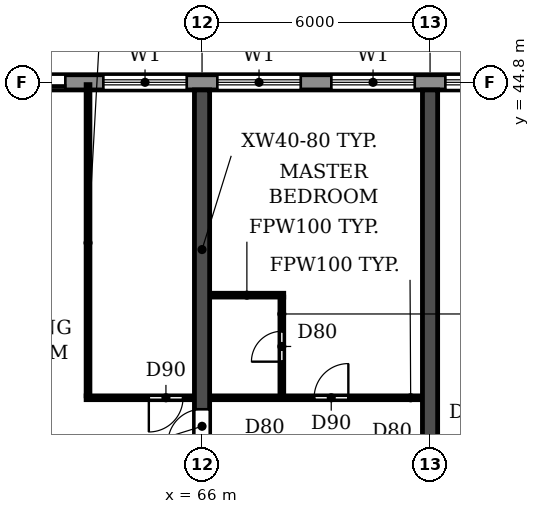
"""IFC4 building model, lengths in metres.
Left out: names, types, materials, properties, quantities, classifications, styles, units other than length and angle.
Written with IfcOpenShell. Run it as: python <this file> out.ifc"""

import sys

from ifc_helpers import new_model, si_unit, direction, frame, frame_2d, origin, place, context, subcontext, project, spatial, rectangle, extrude, element, fill, save


model = new_model("IFC4")
c1 = context("Model", 3, precision=1e-05, world=origin(), true_north=direction((0.0, 1.0)))
c2 = subcontext(c1, "Body", "Model", "MODEL_VIEW")
j1 = project(units=[si_unit("LENGTHUNIT", "METRE"), si_unit("PLANEANGLEUNIT", "RADIAN")], contexts=[c1])
p1 = place(None, origin())
s1 = spatial("IfcSite", under=j1, at=p1, CompositionType="ELEMENT")
p2 = place(p1, origin())
s2 = spatial("IfcBuilding", under=s1, at=p2, CompositionType="ELEMENT")
p3 = place(p2, frame((0.0, 0.0, 23.4)))
s3 = spatial("IfcBuildingStorey", under=s2, at=p3, CompositionType="ELEMENT", Elevation=23.4)
p4 = place(p3, frame((66.0, 30.55, 0.0), z_axis=(0.0, 0.0, 1.0), x_axis=(0.0, 1.0, 0.0)))
e1 = element("IfcWall", 1, at=p4, inside=s3, PredefinedType="SHEAR", context=c2, shape_type="SweptSolid", body=[
    extrude(rectangle(XDim=14.05, YDim=0.4, at=frame_2d((7.025, 0.0))), origin(), (0.0, 0.0, 1.0), 3.05),
])
p5 = place(p4, frame((4.75, 0.0, 0.0)))
e2 = element("IfcOpeningElement", 2, at=p5, cuts=e1, PredefinedType="OPENING", context=c2, shape_type="SweptSolid", body=[
    extrude(rectangle(XDim=0.9, YDim=2.1, at=frame_2d((0.45, 1.05))), frame((0.0, 0.21, 0.0), z_axis=(0.0, -1.0, 0.0), x_axis=(1.0, 0.0, 0.0)), (0.0, 0.0, 1.0), 0.42),
])
p6 = place(p3, frame((72.0, 30.55, 0.0), z_axis=(0.0, 0.0, 1.0), x_axis=(0.0, 1.0, 0.0)))
e3 = element("IfcWall", 3, at=p6, inside=s3, PredefinedType="SHEAR", context=c2, shape_type="SweptSolid", body=[
    extrude(rectangle(XDim=14.05, YDim=0.4, at=frame_2d((7.025, 0.0))), origin(), (0.0, 0.0, 1.0), 3.05),
])
p7 = place(p3, frame((97.317, 44.8, 0.0), z_axis=(0.0, 0.0, 1.0), x_axis=(-1.0, 0.0, 0.0)))
e4 = element("IfcWall", 4, at=p7, inside=s3, PredefinedType="STANDARD", context=c2, shape_type="SweptSolid", body=[
    extrude(rectangle(XDim=92.634, YDim=0.4, at=frame_2d((46.317, 0.0))), origin(), (0.0, 0.0, 1.0), 3.05),
])
p8 = place(p7, frame((88.717, 0.0, 0.9)))
e5 = element("IfcOpeningElement", 5, at=p8, cuts=e4, PredefinedType="OPENING", context=c2, shape_type="SweptSolid", body=[
    extrude(rectangle(XDim=2.2, YDim=1.5, at=frame_2d((1.1, 0.75))), frame((0.0, 0.21, 0.0), z_axis=(0.0, -1.0, 0.0), x_axis=(1.0, 0.0, 0.0)), (0.0, 0.0, 1.0), 0.42),
])
p9 = place(p7, frame((85.917, 0.0, 0.0)))
e6 = element("IfcOpeningElement", 6, at=p9, cuts=e4, PredefinedType="OPENING", context=c2, shape_type="SweptSolid", body=[
    extrude(rectangle(XDim=1.8, YDim=2.4, at=frame_2d((0.9, 1.2))), frame((0.0, 0.21, 0.0), z_axis=(0.0, -1.0, 0.0), x_axis=(1.0, 0.0, 0.0)), (0.0, 0.0, 1.0), 0.42),
])
p10 = place(p7, frame((82.717, 0.0, 0.9)))
e7 = element("IfcOpeningElement", 7, at=p10, cuts=e4, PredefinedType="OPENING", context=c2, shape_type="SweptSolid", body=[
    extrude(rectangle(XDim=2.2, YDim=1.5, at=frame_2d((1.1, 0.75))), frame((0.0, 0.21, 0.0), z_axis=(0.0, -1.0, 0.0), x_axis=(1.0, 0.0, 0.0)), (0.0, 0.0, 1.0), 0.42),
])
p11 = place(p7, frame((79.717, 0.0, 0.9)))
e8 = element("IfcOpeningElement", 8, at=p11, cuts=e4, PredefinedType="OPENING", context=c2, shape_type="SweptSolid", body=[
    extrude(rectangle(XDim=2.2, YDim=1.5, at=frame_2d((1.1, 0.75))), frame((0.0, 0.21, 0.0), z_axis=(0.0, -1.0, 0.0), x_axis=(1.0, 0.0, 0.0)), (0.0, 0.0, 1.0), 0.42),
])
p12 = place(p7, frame((76.917, 0.0, 0.0)))
e9 = element("IfcOpeningElement", 9, at=p12, cuts=e4, PredefinedType="OPENING", context=c2, shape_type="SweptSolid", body=[
    extrude(rectangle(XDim=1.8, YDim=2.4, at=frame_2d((0.9, 1.2))), frame((0.0, 0.21, 0.0), z_axis=(0.0, -1.0, 0.0), x_axis=(1.0, 0.0, 0.0)), (0.0, 0.0, 1.0), 0.42),
])
p13 = place(p7, frame((73.717, 0.0, 0.9)))
e10 = element("IfcOpeningElement", 10, at=p13, cuts=e4, PredefinedType="OPENING", context=c2, shape_type="SweptSolid", body=[
    extrude(rectangle(XDim=2.2, YDim=1.5, at=frame_2d((1.1, 0.75))), frame((0.0, 0.21, 0.0), z_axis=(0.0, -1.0, 0.0), x_axis=(1.0, 0.0, 0.0)), (0.0, 0.0, 1.0), 0.42),
])
p14 = place(p7, frame((70.717, 0.0, 0.9)))
e11 = element("IfcOpeningElement", 11, at=p14, cuts=e4, PredefinedType="OPENING", context=c2, shape_type="SweptSolid", body=[
    extrude(rectangle(XDim=2.2, YDim=1.5, at=frame_2d((1.1, 0.75))), frame((0.0, 0.21, 0.0), z_axis=(0.0, -1.0, 0.0), x_axis=(1.0, 0.0, 0.0)), (0.0, 0.0, 1.0), 0.42),
])
p15 = place(p7, frame((67.717, 0.0, 0.9)))
e12 = element("IfcOpeningElement", 12, at=p15, cuts=e4, PredefinedType="OPENING", context=c2, shape_type="SweptSolid", body=[
    extrude(rectangle(XDim=2.2, YDim=1.5, at=frame_2d((1.1, 0.75))), frame((0.0, 0.21, 0.0), z_axis=(0.0, -1.0, 0.0), x_axis=(1.0, 0.0, 0.0)), (0.0, 0.0, 1.0), 0.42),
])
p16 = place(p7, frame((64.917, 0.0, 0.0)))
e13 = element("IfcOpeningElement", 13, at=p16, cuts=e4, PredefinedType="OPENING", context=c2, shape_type="SweptSolid", body=[
    extrude(rectangle(XDim=1.8, YDim=2.4, at=frame_2d((0.9, 1.2))), frame((0.0, 0.21, 0.0), z_axis=(0.0, -1.0, 0.0), x_axis=(1.0, 0.0, 0.0)), (0.0, 0.0, 1.0), 0.42),
])
p17 = place(p7, frame((61.717, 0.0, 0.9)))
e14 = element("IfcOpeningElement", 14, at=p17, cuts=e4, PredefinedType="OPENING", context=c2, shape_type="SweptSolid", body=[
    extrude(rectangle(XDim=2.2, YDim=1.5, at=frame_2d((1.1, 0.75))), frame((0.0, 0.21, 0.0), z_axis=(0.0, -1.0, 0.0), x_axis=(1.0, 0.0, 0.0)), (0.0, 0.0, 1.0), 0.42),
])
p18 = place(p7, frame((58.717, 0.0, 0.9)))
e15 = element("IfcOpeningElement", 15, at=p18, cuts=e4, PredefinedType="OPENING", context=c2, shape_type="SweptSolid", body=[
    extrude(rectangle(XDim=2.2, YDim=1.5, at=frame_2d((1.1, 0.75))), frame((0.0, 0.21, 0.0), z_axis=(0.0, -1.0, 0.0), x_axis=(1.0, 0.0, 0.0)), (0.0, 0.0, 1.0), 0.42),
])
p19 = place(p7, frame((55.917, 0.0, 0.0)))
e16 = element("IfcOpeningElement", 16, at=p19, cuts=e4, PredefinedType="OPENING", context=c2, shape_type="SweptSolid", body=[
    extrude(rectangle(XDim=1.8, YDim=2.4, at=frame_2d((0.9, 1.2))), frame((0.0, 0.21, 0.0), z_axis=(0.0, -1.0, 0.0), x_axis=(1.0, 0.0, 0.0)), (0.0, 0.0, 1.0), 0.42),
])
p20 = place(p7, frame((52.917, 0.0, 0.0)))
e17 = element("IfcOpeningElement", 17, at=p20, cuts=e4, PredefinedType="OPENING", context=c2, shape_type="SweptSolid", body=[
    extrude(rectangle(XDim=1.8, YDim=2.4, at=frame_2d((0.9, 1.2))), frame((0.0, 0.21, 0.0), z_axis=(0.0, -1.0, 0.0), x_axis=(1.0, 0.0, 0.0)), (0.0, 0.0, 1.0), 0.42),
])
p21 = place(p7, frame((49.717, 0.0, 0.9)))
e18 = element("IfcOpeningElement", 18, at=p21, cuts=e4, PredefinedType="OPENING", context=c2, shape_type="SweptSolid", body=[
    extrude(rectangle(XDim=2.2, YDim=1.5, at=frame_2d((1.1, 0.75))), frame((0.0, 0.21, 0.0), z_axis=(0.0, -1.0, 0.0), x_axis=(1.0, 0.0, 0.0)), (0.0, 0.0, 1.0), 0.42),
])
p22 = place(p7, frame((46.917, 0.0, 0.0)))
e19 = element("IfcOpeningElement", 19, at=p22, cuts=e4, PredefinedType="OPENING", context=c2, shape_type="SweptSolid", body=[
    extrude(rectangle(XDim=1.8, YDim=2.4, at=frame_2d((0.9, 1.2))), frame((0.0, 0.21, 0.0), z_axis=(0.0, -1.0, 0.0), x_axis=(1.0, 0.0, 0.0)), (0.0, 0.0, 1.0), 0.42),
])
p23 = place(p7, frame((43.717, 0.0, 0.9)))
e20 = element("IfcOpeningElement", 20, at=p23, cuts=e4, PredefinedType="OPENING", context=c2, shape_type="SweptSolid", body=[
    extrude(rectangle(XDim=2.2, YDim=1.5, at=frame_2d((1.1, 0.75))), frame((0.0, 0.21, 0.0), z_axis=(0.0, -1.0, 0.0), x_axis=(1.0, 0.0, 0.0)), (0.0, 0.0, 1.0), 0.42),
])
p24 = place(p7, frame((40.717, 0.0, 0.9)))
e21 = element("IfcOpeningElement", 21, at=p24, cuts=e4, PredefinedType="OPENING", context=c2, shape_type="SweptSolid", body=[
    extrude(rectangle(XDim=2.2, YDim=1.5, at=frame_2d((1.1, 0.75))), frame((0.0, 0.21, 0.0), z_axis=(0.0, -1.0, 0.0), x_axis=(1.0, 0.0, 0.0)), (0.0, 0.0, 1.0), 0.42),
])
p25 = place(p7, frame((37.917, 0.0, 0.0)))
e22 = element("IfcOpeningElement", 22, at=p25, cuts=e4, PredefinedType="OPENING", context=c2, shape_type="SweptSolid", body=[
    extrude(rectangle(XDim=1.8, YDim=2.4, at=frame_2d((0.9, 1.2))), frame((0.0, 0.21, 0.0), z_axis=(0.0, -1.0, 0.0), x_axis=(1.0, 0.0, 0.0)), (0.0, 0.0, 1.0), 0.42),
])
p26 = place(p7, frame((34.917, 0.0, 0.0)))
e23 = element("IfcOpeningElement", 23, at=p26, cuts=e4, PredefinedType="OPENING", context=c2, shape_type="SweptSolid", body=[
    extrude(rectangle(XDim=1.8, YDim=2.4, at=frame_2d((0.9, 1.2))), frame((0.0, 0.21, 0.0), z_axis=(0.0, -1.0, 0.0), x_axis=(1.0, 0.0, 0.0)), (0.0, 0.0, 1.0), 0.42),
])
p27 = place(p7, frame((31.717, 0.0, 0.9)))
e24 = element("IfcOpeningElement", 24, at=p27, cuts=e4, PredefinedType="OPENING", context=c2, shape_type="SweptSolid", body=[
    extrude(rectangle(XDim=2.2, YDim=1.5, at=frame_2d((1.1, 0.75))), frame((0.0, 0.21, 0.0), z_axis=(0.0, -1.0, 0.0), x_axis=(1.0, 0.0, 0.0)), (0.0, 0.0, 1.0), 0.42),
])
p28 = place(p7, frame((28.717, 0.0, 0.9)))
e25 = element("IfcOpeningElement", 25, at=p28, cuts=e4, PredefinedType="OPENING", context=c2, shape_type="SweptSolid", body=[
    extrude(rectangle(XDim=2.2, YDim=1.5, at=frame_2d((1.1, 0.75))), frame((0.0, 0.21, 0.0), z_axis=(0.0, -1.0, 0.0), x_axis=(1.0, 0.0, 0.0)), (0.0, 0.0, 1.0), 0.42),
])
p29 = place(p7, frame((25.717, 0.0, 0.9)))
e26 = element("IfcOpeningElement", 26, at=p29, cuts=e4, PredefinedType="OPENING", context=c2, shape_type="SweptSolid", body=[
    extrude(rectangle(XDim=2.2, YDim=1.5, at=frame_2d((1.1, 0.75))), frame((0.0, 0.21, 0.0), z_axis=(0.0, -1.0, 0.0), x_axis=(1.0, 0.0, 0.0)), (0.0, 0.0, 1.0), 0.42),
])
p30 = place(p7, frame((22.717, 0.0, 0.9)))
e27 = element("IfcOpeningElement", 27, at=p30, cuts=e4, PredefinedType="OPENING", context=c2, shape_type="SweptSolid", body=[
    extrude(rectangle(XDim=2.2, YDim=1.5, at=frame_2d((1.1, 0.75))), frame((0.0, 0.21, 0.0), z_axis=(0.0, -1.0, 0.0), x_axis=(1.0, 0.0, 0.0)), (0.0, 0.0, 1.0), 0.42),
])
p31 = place(p7, frame((19.917, 0.0, 0.0)))
e28 = element("IfcOpeningElement", 28, at=p31, cuts=e4, PredefinedType="OPENING", context=c2, shape_type="SweptSolid", body=[
    extrude(rectangle(XDim=1.8, YDim=2.4, at=frame_2d((0.9, 1.2))), frame((0.0, 0.21, 0.0), z_axis=(0.0, -1.0, 0.0), x_axis=(1.0, 0.0, 0.0)), (0.0, 0.0, 1.0), 0.42),
])
p32 = place(p7, frame((16.717, 0.0, 0.9)))
e29 = element("IfcOpeningElement", 29, at=p32, cuts=e4, PredefinedType="OPENING", context=c2, shape_type="SweptSolid", body=[
    extrude(rectangle(XDim=2.2, YDim=1.5, at=frame_2d((1.1, 0.75))), frame((0.0, 0.21, 0.0), z_axis=(0.0, -1.0, 0.0), x_axis=(1.0, 0.0, 0.0)), (0.0, 0.0, 1.0), 0.42),
])
p33 = place(p7, frame((13.717, 0.0, 0.9)))
e30 = element("IfcOpeningElement", 30, at=p33, cuts=e4, PredefinedType="OPENING", context=c2, shape_type="SweptSolid", body=[
    extrude(rectangle(XDim=2.2, YDim=1.5, at=frame_2d((1.1, 0.75))), frame((0.0, 0.21, 0.0), z_axis=(0.0, -1.0, 0.0), x_axis=(1.0, 0.0, 0.0)), (0.0, 0.0, 1.0), 0.42),
])
p34 = place(p7, frame((10.717, 0.0, 0.9)))
e31 = element("IfcOpeningElement", 31, at=p34, cuts=e4, PredefinedType="OPENING", context=c2, shape_type="SweptSolid", body=[
    extrude(rectangle(XDim=2.2, YDim=1.5, at=frame_2d((1.1, 0.75))), frame((0.0, 0.21, 0.0), z_axis=(0.0, -1.0, 0.0), x_axis=(1.0, 0.0, 0.0)), (0.0, 0.0, 1.0), 0.42),
])
p35 = place(p7, frame((7.917, 0.0, 0.0)))
e32 = element("IfcOpeningElement", 32, at=p35, cuts=e4, PredefinedType="OPENING", context=c2, shape_type="SweptSolid", body=[
    extrude(rectangle(XDim=1.8, YDim=2.4, at=frame_2d((0.9, 1.2))), frame((0.0, 0.21, 0.0), z_axis=(0.0, -1.0, 0.0), x_axis=(1.0, 0.0, 0.0)), (0.0, 0.0, 1.0), 0.42),
])
p36 = place(p7, frame((4.917, 0.0, 0.0)))
e33 = element("IfcOpeningElement", 33, at=p36, cuts=e4, PredefinedType="OPENING", context=c2, shape_type="SweptSolid", body=[
    extrude(rectangle(XDim=1.8, YDim=2.4, at=frame_2d((0.9, 1.2))), frame((0.0, 0.21, 0.0), z_axis=(0.0, -1.0, 0.0), x_axis=(1.0, 0.0, 0.0)), (0.0, 0.0, 1.0), 0.42),
])
p37 = place(p7, frame((1.717, 0.0, 0.9)))
e34 = element("IfcOpeningElement", 34, at=p37, cuts=e4, PredefinedType="OPENING", context=c2, shape_type="SweptSolid", body=[
    extrude(rectangle(XDim=2.2, YDim=1.5, at=frame_2d((1.1, 0.75))), frame((0.0, 0.21, 0.0), z_axis=(0.0, -1.0, 0.0), x_axis=(1.0, 0.0, 0.0)), (0.0, 0.0, 1.0), 0.42),
])
p38 = place(p3, frame((62.95, 36.5, 0.0), z_axis=(0.0, 0.0, 1.0), x_axis=(1.0, 0.0, 0.0)))
e35 = element("IfcWall", 35, at=p38, inside=s3, PredefinedType="PARTITIONING", context=c2, shape_type="SweptSolid", body=[
    extrude(rectangle(XDim=2.84, YDim=0.1, at=frame_2d((1.42, 0.0))), origin(), (0.0, 0.0, 1.0), 3.05),
])
p39 = place(p38, frame((1.65, 0.0, 0.0)))
e36 = element("IfcOpeningElement", 36, at=p39, cuts=e35, PredefinedType="OPENING", context=c2, shape_type="SweptSolid", body=[
    extrude(rectangle(XDim=0.9, YDim=2.1, at=frame_2d((0.45, 1.05))), frame((0.0, 0.06, 0.0), z_axis=(0.0, -1.0, 0.0), x_axis=(1.0, 0.0, 0.0)), (0.0, 0.0, 1.0), 0.12),
])
p40 = place(p3, frame((66.21, 36.5, 0.0), z_axis=(0.0, 0.0, 1.0), x_axis=(1.0, 0.0, 0.0)))
e37 = element("IfcWall", 37, at=p40, inside=s3, PredefinedType="PARTITIONING", context=c2, shape_type="SweptSolid", body=[
    extrude(rectangle(XDim=5.58, YDim=0.1, at=frame_2d((2.79, 0.0))), origin(), (0.0, 0.0, 1.0), 3.05),
])
p41 = place(p40, frame((2.74, 0.0, 0.0)))
e38 = element("IfcOpeningElement", 38, at=p41, cuts=e37, PredefinedType="OPENING", context=c2, shape_type="SweptSolid", body=[
    extrude(rectangle(XDim=0.9, YDim=2.1, at=frame_2d((0.45, 1.05))), frame((0.0, 0.06, 0.0), z_axis=(0.0, -1.0, 0.0), x_axis=(1.0, 0.0, 0.0)), (0.0, 0.0, 1.0), 0.12),
])
p42 = place(p3, frame((66.21, 39.2, 0.0), z_axis=(0.0, 0.0, 1.0), x_axis=(1.0, 0.0, 0.0)))
e39 = element("IfcWall", 39, at=p42, inside=s3, PredefinedType="PARTITIONING", context=c2, shape_type="SweptSolid", body=[
    extrude(rectangle(XDim=1.94, YDim=0.1, at=frame_2d((0.97, 0.0))), origin(), (0.0, 0.0, 1.0), 3.05),
])
p43 = place(p3, frame((63.0, 36.55, 0.0), z_axis=(0.0, 0.0, 1.0), x_axis=(0.0, 1.0, 0.0)))
e40 = element("IfcWall", 40, at=p43, inside=s3, PredefinedType="PARTITIONING", context=c2, shape_type="SweptSolid", body=[
    extrude(rectangle(XDim=8.19, YDim=0.1, at=frame_2d((4.095, 0.0))), origin(), (0.0, 0.0, 1.0), 3.05),
])
p44 = place(p3, frame((68.1, 36.55, 0.0), z_axis=(0.0, 0.0, 1.0), x_axis=(0.0, 1.0, 0.0)))
e41 = element("IfcWall", 41, at=p44, inside=s3, PredefinedType="PARTITIONING", context=c2, shape_type="SweptSolid", body=[
    extrude(rectangle(XDim=2.6, YDim=0.1, at=frame_2d((1.3, 0.0))), origin(), (0.0, 0.0, 1.0), 3.05),
])
p45 = place(p44, frame((0.9, 0.0, 0.0)))
e42 = element("IfcOpeningElement", 42, at=p45, cuts=e41, PredefinedType="OPENING", context=c2, shape_type="SweptSolid", body=[
    extrude(rectangle(XDim=0.8, YDim=2.1, at=frame_2d((0.4, 1.05))), frame((0.0, 0.06, 0.0), z_axis=(0.0, -1.0, 0.0), x_axis=(1.0, 0.0, 0.0)), (0.0, 0.0, 1.0), 0.12),
])
p46 = place(p26, origin())
e43 = element("IfcDoor", 43, at=p46, inside=s3, OperationType="DOUBLE_DOOR_SLIDING", PredefinedType="DOOR", context=c2, shape_type="SweptSolid", body=[
    extrude(rectangle(XDim=1.8, YDim=2.4, at=frame_2d((0.9, 1.2))), frame((0.0, 0.025, 0.0), z_axis=(0.0, -1.0, 0.0), x_axis=(1.0, 0.0, 0.0)), (0.0, 0.0, 1.0), 0.05),
])
fill(e23, e43)
p47 = place(p27, origin())
e44 = element("IfcWindow", 44, at=p47, inside=s3, PartitioningType="DOUBLE_PANEL_HORIZONTAL", PredefinedType="WINDOW", context=c2, shape_type="SweptSolid", body=[
    extrude(rectangle(XDim=2.2, YDim=1.5, at=frame_2d((1.1, 0.75))), frame((0.0, 0.03, 0.0), z_axis=(0.0, -1.0, 0.0), x_axis=(1.0, 0.0, 0.0)), (0.0, 0.0, 1.0), 0.06),
])
fill(e24, e44)
p48 = place(p28, origin())
e45 = element("IfcWindow", 45, at=p48, inside=s3, PartitioningType="DOUBLE_PANEL_HORIZONTAL", PredefinedType="WINDOW", context=c2, shape_type="SweptSolid", body=[
    extrude(rectangle(XDim=2.2, YDim=1.5, at=frame_2d((1.1, 0.75))), frame((0.0, 0.03, 0.0), z_axis=(0.0, -1.0, 0.0), x_axis=(1.0, 0.0, 0.0)), (0.0, 0.0, 1.0), 0.06),
])
fill(e25, e45)
p49 = place(p29, origin())
e46 = element("IfcWindow", 46, at=p49, inside=s3, PartitioningType="DOUBLE_PANEL_HORIZONTAL", PredefinedType="WINDOW", context=c2, shape_type="SweptSolid", body=[
    extrude(rectangle(XDim=2.2, YDim=1.5, at=frame_2d((1.1, 0.75))), frame((0.0, 0.03, 0.0), z_axis=(0.0, -1.0, 0.0), x_axis=(1.0, 0.0, 0.0)), (0.0, 0.0, 1.0), 0.06),
])
fill(e26, e46)
p50 = place(p30, origin())
e47 = element("IfcWindow", 47, at=p50, inside=s3, PartitioningType="DOUBLE_PANEL_HORIZONTAL", PredefinedType="WINDOW", context=c2, shape_type="SweptSolid", body=[
    extrude(rectangle(XDim=2.2, YDim=1.5, at=frame_2d((1.1, 0.75))), frame((0.0, 0.03, 0.0), z_axis=(0.0, -1.0, 0.0), x_axis=(1.0, 0.0, 0.0)), (0.0, 0.0, 1.0), 0.06),
])
fill(e27, e47)
p51 = place(p41, origin())
e48 = element("IfcDoor", 48, at=p51, inside=s3, OperationType="SINGLE_SWING_RIGHT", PredefinedType="DOOR", context=c2, shape_type="SweptSolid", body=[
    extrude(rectangle(XDim=0.9, YDim=2.1, at=frame_2d((0.45, 1.05))), frame((0.0, 0.025, 0.0), z_axis=(0.0, -1.0, 0.0), x_axis=(1.0, 0.0, 0.0)), (0.0, 0.0, 1.0), 0.05),
])
fill(e38, e48)
p52 = place(p39, frame((0.9, 0.0, 0.0), z_axis=(0.0, 0.0, 1.0), x_axis=(-1.0, 0.0, 0.0)))
e49 = element("IfcDoor", 49, at=p52, inside=s3, OperationType="SINGLE_SWING_RIGHT", PredefinedType="DOOR", context=c2, shape_type="SweptSolid", body=[
    extrude(rectangle(XDim=0.9, YDim=2.1, at=frame_2d((0.45, 1.05))), frame((0.0, 0.025, 0.0), z_axis=(0.0, -1.0, 0.0), x_axis=(1.0, 0.0, 0.0)), (0.0, 0.0, 1.0), 0.05),
])
fill(e36, e49)
p53 = place(p5, origin())
e50 = element("IfcDoor", 50, at=p53, inside=s3, OperationType="SINGLE_SWING_LEFT", PredefinedType="DOOR", context=c2, shape_type="SweptSolid", body=[
    extrude(rectangle(XDim=0.9, YDim=2.1, at=frame_2d((0.45, 1.05))), frame((0.0, 0.025, 0.0), z_axis=(0.0, -1.0, 0.0), x_axis=(1.0, 0.0, 0.0)), (0.0, 0.0, 1.0), 0.05),
])
fill(e2, e50)
p54 = place(p45, origin())
e51 = element("IfcDoor", 51, at=p54, inside=s3, OperationType="SINGLE_SWING_LEFT", PredefinedType="DOOR", context=c2, shape_type="SweptSolid", body=[
    extrude(rectangle(XDim=0.8, YDim=2.1, at=frame_2d((0.4, 1.05))), frame((0.0, 0.025, 0.0), z_axis=(0.0, -1.0, 0.0), x_axis=(1.0, 0.0, 0.0)), (0.0, 0.0, 1.0), 0.05),
])
fill(e42, e51)
save(model, sys.argv[1])
